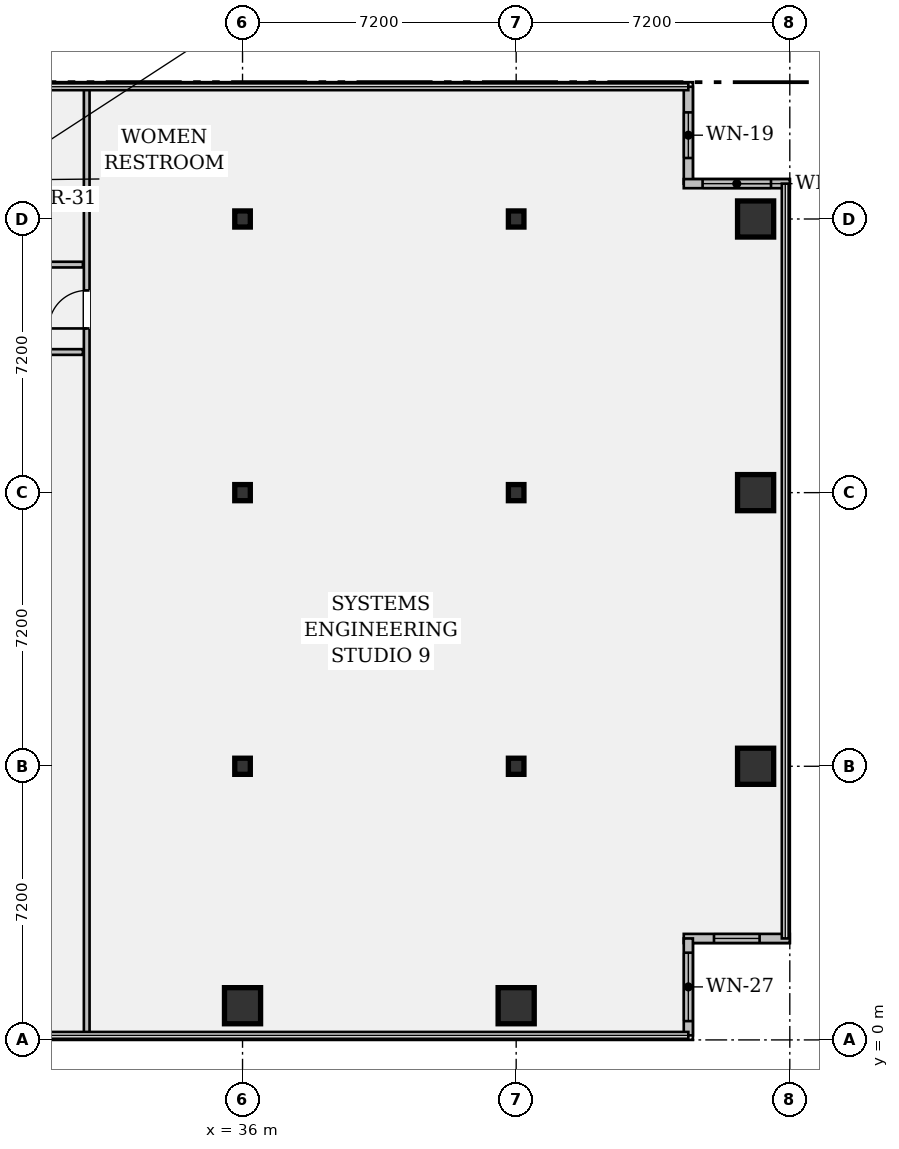
"""IFC4 building model, lengths in metres.
Left out: names, types, materials, properties, quantities, classifications, styles, units other than length and angle.
Written with IfcOpenShell. Run it as: python <this file> out.ifc"""

import sys

from ifc_helpers import new_model, si_unit, direction, frame, frame_2d, origin, origin_2d, place, context, subcontext, project, spatial, rectangle, hollow_rectangle, i_section, extrude, element, fill, save


model = new_model("IFC4")
c1 = context("Model", 3, precision=1e-05, world=origin(), true_north=direction((0.0, 1.0)))
c2 = subcontext(c1, "Body", "Model", "MODEL_VIEW")
j1 = project(units=[si_unit("LENGTHUNIT", "METRE"), si_unit("PLANEANGLEUNIT", "RADIAN")], contexts=[c1])
p1 = place(None, origin())
s1 = spatial("IfcSite", under=j1, at=p1, CompositionType="ELEMENT")
p2 = place(p1, origin())
s2 = spatial("IfcBuilding", under=s1, at=p2, CompositionType="ELEMENT")
p3 = place(p2, frame((0.0, 0.0, 81.2)))
s3 = spatial("IfcBuildingStorey", under=s2, at=p3, CompositionType="ELEMENT", Elevation=81.2)
p4 = place(p3, frame((36.0, 0.9, 0.0), z_axis=(0.0, 0.0, 1.0), x_axis=(1.0, 0.0, 0.0)))
e1 = element("IfcColumn", 1, at=p4, inside=s3, PredefinedType="COLUMN", context=c2, shape_type="SweptSolid", body=[
    extrude(hollow_rectangle(XDim=0.95, YDim=0.95, WallThickness=0.06, at=origin_2d()), origin(), (0.0, 0.0, 1.0), 3.57),
])
for number, where, z_axis, x_axis in (
    (2, (36.0, 7.2, 0.0), (0.0, 0.0, 1.0), (1.0, 0.0, 0.0)),
    (3, (36.0, 14.4, 0.0), (0.0, 0.0, 1.0), (1.0, 0.0, 0.0)),
    (4, (36.0, 21.6, 0.0), (0.0, 0.0, 1.0), (1.0, 0.0, 0.0)),
):
    element("IfcColumn", number, at=place(p3, frame(where, z_axis=z_axis, x_axis=x_axis)), inside=s3, PredefinedType="COLUMN", context=c2, shape_type="SweptSolid", body=[
        extrude(i_section(OverallWidth=0.409, OverallDepth=0.424, WebThickness=0.033, FlangeThickness=0.052, FilletRadius=0.018, at=origin_2d()), origin(), (0.0, 0.0, 1.0), 3.57),
    ])
p5 = place(p3, frame((43.2, 0.9, 0.0), z_axis=(0.0, 0.0, 1.0), x_axis=(1.0, 0.0, 0.0)))
e5 = element("IfcColumn", 5, at=p5, inside=s3, PredefinedType="COLUMN", context=c2, shape_type="SweptSolid", body=[
    extrude(hollow_rectangle(XDim=0.95, YDim=0.95, WallThickness=0.06, at=origin_2d()), origin(), (0.0, 0.0, 1.0), 3.57),
])
for number, where, z_axis, x_axis in (
    (6, (43.2, 7.2, 0.0), (0.0, 0.0, 1.0), (1.0, 0.0, 0.0)),
    (7, (43.2, 14.4, 0.0), (0.0, 0.0, 1.0), (1.0, 0.0, 0.0)),
    (8, (43.2, 21.6, 0.0), (0.0, 0.0, 1.0), (1.0, 0.0, 0.0)),
):
    element("IfcColumn", number, at=place(p3, frame(where, z_axis=z_axis, x_axis=x_axis)), inside=s3, PredefinedType="COLUMN", context=c2, shape_type="SweptSolid", body=[
        extrude(i_section(OverallWidth=0.409, OverallDepth=0.424, WebThickness=0.033, FlangeThickness=0.052, FilletRadius=0.018, at=origin_2d()), origin(), (0.0, 0.0, 1.0), 3.57),
    ])
for number, where, z_axis, x_axis in (
    (9, (49.5, 7.2, 0.0), (0.0, 0.0, 1.0), (1.0, 0.0, 0.0)),
    (10, (49.5, 14.4, 0.0), (0.0, 0.0, 1.0), (1.0, 0.0, 0.0)),
    (11, (49.5, 21.6, 0.0), (0.0, 0.0, 1.0), (1.0, 0.0, 0.0)),
):
    element("IfcColumn", number, at=place(p3, frame(where, z_axis=z_axis, x_axis=x_axis)), inside=s3, PredefinedType="COLUMN", context=c2, shape_type="SweptSolid", body=[
        extrude(hollow_rectangle(XDim=0.95, YDim=0.95, WallThickness=0.06, at=origin_2d()), origin(), (0.0, 0.0, 1.0), 3.57),
    ])
p6 = place(p3, frame((47.73, 25.08, 0.0), z_axis=(0.0, 0.0, 1.0), x_axis=(0.0, -1.0, 0.0)))
e12 = element("IfcWall", 12, at=p6, inside=s3, PredefinedType="STANDARD", context=c2, shape_type="SweptSolid", body=[
    extrude(rectangle(XDim=2.55, YDim=0.24, at=frame_2d((1.275, 0.0))), origin(), (0.0, 0.0, 1.0), 3.57),
])
p7 = place(p6, frame((0.675, 0.0, 0.95)))
e13 = element("IfcOpeningElement", 13, at=p7, cuts=e12, PredefinedType="OPENING", context=c2, shape_type="SweptSolid", body=[
    extrude(rectangle(XDim=1.2, YDim=1.8, at=frame_2d((0.6, 0.9))), frame((0.0, 0.132, 0.0), z_axis=(0.0, -1.0, 0.0), x_axis=(1.0, 0.0, 0.0)), (0.0, 0.0, 1.0), 0.264),
])
p8 = place(p3, frame((47.61, 22.53, 0.0), z_axis=(0.0, 0.0, 1.0), x_axis=(1.0, 0.0, 0.0)))
e14 = element("IfcWall", 14, at=p8, inside=s3, PredefinedType="STANDARD", context=c2, shape_type="SweptSolid", body=[
    extrude(rectangle(XDim=2.79, YDim=0.24, at=frame_2d((1.395, 0.0))), origin(), (0.0, 0.0, 1.0), 3.57),
])
p9 = place(p8, frame((0.495, 0.0, 0.95)))
e15 = element("IfcOpeningElement", 15, at=p9, cuts=e14, PredefinedType="OPENING", context=c2, shape_type="SweptSolid", body=[
    extrude(rectangle(XDim=1.8, YDim=1.35, at=frame_2d((0.9, 0.675))), frame((0.0, 0.132, 0.0), z_axis=(0.0, -1.0, 0.0), x_axis=(1.0, 0.0, 0.0)), (0.0, 0.0, 1.0), 0.264),
])
p10 = place(p3, frame((50.4, 2.67, 0.0), z_axis=(0.0, 0.0, 1.0), x_axis=(-1.0, 0.0, 0.0)))
e16 = element("IfcWall", 16, at=p10, inside=s3, PredefinedType="STANDARD", context=c2, shape_type="SweptSolid", body=[
    extrude(rectangle(XDim=2.79, YDim=0.24, at=frame_2d((1.395, 0.0))), origin(), (0.0, 0.0, 1.0), 3.57),
])
p11 = place(p10, frame((0.795, 0.0, 0.95)))
e17 = element("IfcOpeningElement", 17, at=p11, cuts=e16, PredefinedType="OPENING", context=c2, shape_type="SweptSolid", body=[
    extrude(rectangle(XDim=1.2, YDim=1.8, at=frame_2d((0.6, 0.9))), frame((0.0, 0.132, 0.0), z_axis=(0.0, -1.0, 0.0), x_axis=(1.0, 0.0, 0.0)), (0.0, 0.0, 1.0), 0.264),
])
p12 = place(p3, frame((47.73, 2.67, 0.0), z_axis=(0.0, 0.0, 1.0), x_axis=(0.0, -1.0, 0.0)))
e18 = element("IfcWall", 18, at=p12, inside=s3, PredefinedType="STANDARD", context=c2, shape_type="SweptSolid", body=[
    extrude(rectangle(XDim=2.55, YDim=0.24, at=frame_2d((1.275, 0.0))), origin(), (0.0, 0.0, 1.0), 3.57),
])
p13 = place(p12, frame((0.375, 0.0, 0.95)))
e19 = element("IfcOpeningElement", 19, at=p13, cuts=e18, PredefinedType="OPENING", context=c2, shape_type="SweptSolid", body=[
    extrude(rectangle(XDim=1.8, YDim=1.35, at=frame_2d((0.9, 0.675))), frame((0.0, 0.132, 0.0), z_axis=(0.0, -1.0, 0.0), x_axis=(1.0, 0.0, 0.0)), (0.0, 0.0, 1.0), 0.264),
])
p14 = place(p3, frame((17.35, 18.1, 0.0), z_axis=(0.0, 0.0, 1.0), x_axis=(1.0, 0.0, 0.0)))
e20 = element("IfcWall", 20, at=p14, inside=s3, PredefinedType="PARTITIONING", context=c2, shape_type="SweptSolid", body=[
    extrude(rectangle(XDim=14.45, YDim=0.15, at=frame_2d((7.225, 0.0))), origin(), (0.0, 0.0, 1.0), 2.783),
])
p15 = place(p14, frame((2.23, 0.0, 0.0)))
e21 = element("IfcOpeningElement", 21, at=p15, cuts=e20, PredefinedType="OPENING", context=c2, shape_type="SweptSolid", body=[
    extrude(rectangle(XDim=0.95, YDim=2.15, at=frame_2d((0.475, 1.075))), frame((0.0, 0.087, 0.0), z_axis=(0.0, -1.0, 0.0), x_axis=(1.0, 0.0, 0.0)), (0.0, 0.0, 1.0), 0.174),
])
p16 = place(p14, frame((7.95, 0.0, 0.0)))
e22 = element("IfcOpeningElement", 22, at=p16, cuts=e20, PredefinedType="OPENING", context=c2, shape_type="SweptSolid", body=[
    extrude(rectangle(XDim=0.95, YDim=2.15, at=frame_2d((0.475, 1.075))), frame((0.0, 0.087, 0.0), z_axis=(0.0, -1.0, 0.0), x_axis=(1.0, 0.0, 0.0)), (0.0, 0.0, 1.0), 0.174),
])
p17 = place(p14, frame((12.45, 0.0, 0.0)))
e23 = element("IfcOpeningElement", 23, at=p17, cuts=e20, PredefinedType="OPENING", context=c2, shape_type="SweptSolid", body=[
    extrude(rectangle(XDim=0.95, YDim=2.15, at=frame_2d((0.475, 1.075))), frame((0.0, 0.087, 0.0), z_axis=(0.0, -1.0, 0.0), x_axis=(1.0, 0.0, 0.0)), (0.0, 0.0, 1.0), 0.174),
])
p18 = place(p3, frame((17.35, 20.4, 0.0), z_axis=(0.0, 0.0, 1.0), x_axis=(1.0, 0.0, 0.0)))
e24 = element("IfcWall", 24, at=p18, inside=s3, PredefinedType="PARTITIONING", context=c2, shape_type="SweptSolid", body=[
    extrude(rectangle(XDim=14.45, YDim=0.15, at=frame_2d((7.225, 0.0))), origin(), (0.0, 0.0, 1.0), 2.783),
])
p19 = place(p18, frame((0.7, 0.0, 0.0)))
e25 = element("IfcOpeningElement", 25, at=p19, cuts=e24, PredefinedType="OPENING", context=c2, shape_type="SweptSolid", body=[
    extrude(rectangle(XDim=0.85, YDim=2.15, at=frame_2d((0.425, 1.075))), frame((0.0, 0.087, 0.0), z_axis=(0.0, -1.0, 0.0), x_axis=(1.0, 0.0, 0.0)), (0.0, 0.0, 1.0), 0.174),
])
p20 = place(p18, frame((4.75, 0.0, 0.0)))
e26 = element("IfcOpeningElement", 26, at=p20, cuts=e24, PredefinedType="OPENING", context=c2, shape_type="SweptSolid", body=[
    extrude(rectangle(XDim=0.85, YDim=2.15, at=frame_2d((0.425, 1.075))), frame((0.0, 0.087, 0.0), z_axis=(0.0, -1.0, 0.0), x_axis=(1.0, 0.0, 0.0)), (0.0, 0.0, 1.0), 0.174),
])
p21 = place(p18, frame((6.46, 0.0, 0.0)))
e27 = element("IfcOpeningElement", 27, at=p21, cuts=e24, PredefinedType="OPENING", context=c2, shape_type="SweptSolid", body=[
    extrude(rectangle(XDim=0.85, YDim=2.15, at=frame_2d((0.425, 1.075))), frame((0.0, 0.087, 0.0), z_axis=(0.0, -1.0, 0.0), x_axis=(1.0, 0.0, 0.0)), (0.0, 0.0, 1.0), 0.174),
])
p22 = place(p18, frame((9.5, 0.0, 0.0)))
e28 = element("IfcOpeningElement", 28, at=p22, cuts=e24, PredefinedType="OPENING", context=c2, shape_type="SweptSolid", body=[
    extrude(rectangle(XDim=0.95, YDim=2.15, at=frame_2d((0.475, 1.075))), frame((0.0, 0.087, 0.0), z_axis=(0.0, -1.0, 0.0), x_axis=(1.0, 0.0, 0.0)), (0.0, 0.0, 1.0), 0.174),
])
p23 = place(p3, frame((31.9, 0.12, 0.0), z_axis=(0.0, 0.0, 1.0), x_axis=(0.0, 1.0, 0.0)))
e29 = element("IfcWall", 29, at=p23, inside=s3, PredefinedType="PARTITIONING", context=c2, shape_type="SweptSolid", body=[
    extrude(rectangle(XDim=24.96, YDim=0.15, at=frame_2d((12.48, 0.0))), origin(), (0.0, 0.0, 1.0), 2.783),
])
p24 = place(p23, frame((18.6, 0.0, 0.0)))
e30 = element("IfcOpeningElement", 30, at=p24, cuts=e29, PredefinedType="OPENING", context=c2, shape_type="SweptSolid", body=[
    extrude(rectangle(XDim=1.0, YDim=2.15, at=frame_2d((0.5, 1.075))), frame((0.0, 0.087, 0.0), z_axis=(0.0, -1.0, 0.0), x_axis=(1.0, 0.0, 0.0)), (0.0, 0.0, 1.0), 0.174),
])
p25 = place(p7, origin())
e31 = element("IfcWindow", 31, at=p25, inside=s3, PartitioningType="SINGLE_PANEL", PredefinedType="WINDOW", context=c2, shape_type="SweptSolid", body=[
    extrude(rectangle(XDim=1.2, YDim=1.8, at=frame_2d((0.6, 0.9))), frame((0.0, 0.03, 0.0), z_axis=(0.0, -1.0, 0.0), x_axis=(1.0, 0.0, 0.0)), (0.0, 0.0, 1.0), 0.06),
])
fill(e13, e31)
p26 = place(p9, origin())
e32 = element("IfcWindow", 32, at=p26, inside=s3, PartitioningType="SINGLE_PANEL", PredefinedType="WINDOW", context=c2, shape_type="SweptSolid", body=[
    extrude(rectangle(XDim=1.8, YDim=1.35, at=frame_2d((0.9, 0.675))), frame((0.0, 0.03, 0.0), z_axis=(0.0, -1.0, 0.0), x_axis=(1.0, 0.0, 0.0)), (0.0, 0.0, 1.0), 0.06),
])
fill(e15, e32)
p27 = place(p11, origin())
e33 = element("IfcWindow", 33, at=p27, inside=s3, PartitioningType="SINGLE_PANEL", PredefinedType="WINDOW", context=c2, shape_type="SweptSolid", body=[
    extrude(rectangle(XDim=1.2, YDim=1.8, at=frame_2d((0.6, 0.9))), frame((0.0, 0.03, 0.0), z_axis=(0.0, -1.0, 0.0), x_axis=(1.0, 0.0, 0.0)), (0.0, 0.0, 1.0), 0.06),
])
fill(e17, e33)
p28 = place(p13, origin())
e34 = element("IfcWindow", 34, at=p28, inside=s3, PartitioningType="SINGLE_PANEL", PredefinedType="WINDOW", context=c2, shape_type="SweptSolid", body=[
    extrude(rectangle(XDim=1.8, YDim=1.35, at=frame_2d((0.9, 0.675))), frame((0.0, 0.03, 0.0), z_axis=(0.0, -1.0, 0.0), x_axis=(1.0, 0.0, 0.0)), (0.0, 0.0, 1.0), 0.06),
])
fill(e19, e34)
p29 = place(p24, origin())
e35 = element("IfcDoor", 35, at=p29, inside=s3, OperationType="SINGLE_SWING_LEFT", PredefinedType="DOOR", context=c2, shape_type="SweptSolid", body=[
    extrude(rectangle(XDim=1.0, YDim=2.15, at=frame_2d((0.5, 1.075))), frame((0.0, 0.025, 0.0), z_axis=(0.0, -1.0, 0.0), x_axis=(1.0, 0.0, 0.0)), (0.0, 0.0, 1.0), 0.05),
])
fill(e30, e35)
save(model, sys.argv[1])
